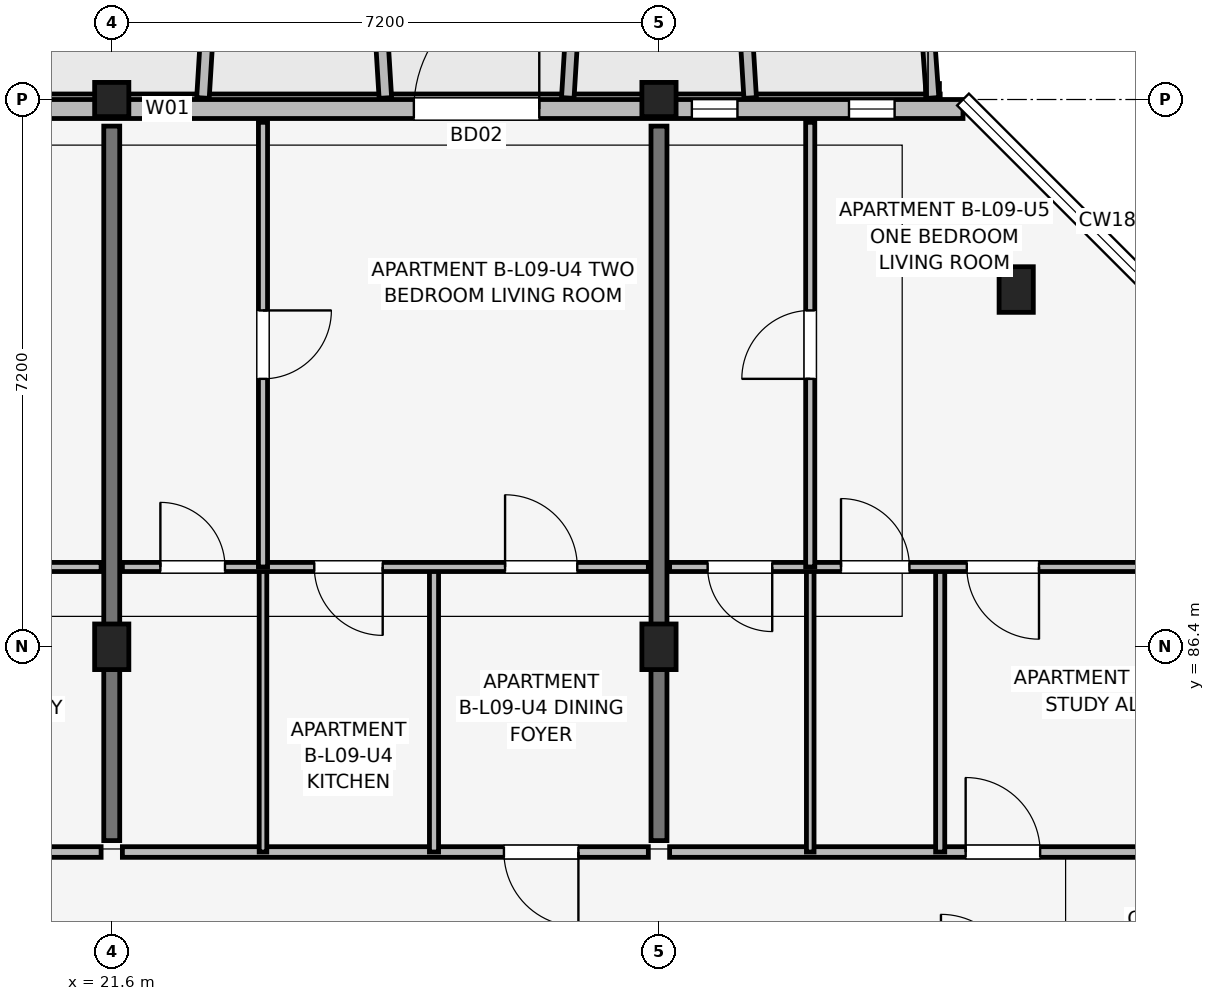
"""IFC4 building model, lengths in metres.
Left out: names, types, materials, properties, quantities, classifications, styles, units other than length and angle.
Written with IfcOpenShell. Run it as: python <this file> out.ifc"""

import sys

from ifc_helpers import new_model, si_unit, direction, frame, frame_2d, origin, origin_2d, place, context, subcontext, project, spatial, rectangle, extrude, element, fill, save


model = new_model("IFC4")
c1 = context("Model", 3, precision=1e-05, world=origin(), true_north=direction((0.0, 1.0)))
c2 = subcontext(c1, "Body", "Model", "MODEL_VIEW")
j1 = project(units=[si_unit("LENGTHUNIT", "METRE"), si_unit("PLANEANGLEUNIT", "RADIAN")], contexts=[c1])
p1 = place(None, origin())
s1 = spatial("IfcSite", under=j1, at=p1, CompositionType="ELEMENT")
p2 = place(p1, origin())
s2 = spatial("IfcBuilding", under=s1, at=p2, CompositionType="ELEMENT")
p3 = place(p2, frame((0.0, 0.0, 30.75)))
s3 = spatial("IfcBuildingStorey", under=s2, at=p3, CompositionType="ELEMENT", Elevation=30.75)
p4 = place(p3, frame((21.6, 86.4, 0.0), z_axis=(0.0, 0.0, 1.0), x_axis=(1.0, 0.0, 0.0)))
e1 = element("IfcColumn", 1, at=p4, inside=s3, PredefinedType="COLUMN", context=c2, shape_type="SweptSolid", body=[
    extrude(rectangle(XDim=0.45, YDim=0.6, at=origin_2d()), origin(), (0.0, 0.0, 1.0), 3.15),
])
p5 = place(p3, frame((21.6, 93.6, 0.0), z_axis=(0.0, 0.0, 1.0), x_axis=(1.0, 0.0, 0.0)))
e2 = element("IfcColumn", 2, at=p5, inside=s3, PredefinedType="COLUMN", context=c2, shape_type="SweptSolid", body=[
    extrude(rectangle(XDim=0.45, YDim=0.45, at=origin_2d()), origin(), (0.0, 0.0, 1.0), 3.15),
])
p6 = place(p3, frame((28.8, 86.4, 0.0), z_axis=(0.0, 0.0, 1.0), x_axis=(1.0, 0.0, 0.0)))
e3 = element("IfcColumn", 3, at=p6, inside=s3, PredefinedType="COLUMN", context=c2, shape_type="SweptSolid", body=[
    extrude(rectangle(XDim=0.45, YDim=0.6, at=origin_2d()), origin(), (0.0, 0.0, 1.0), 3.15),
])
p7 = place(p3, frame((28.8, 93.6, 0.0), z_axis=(0.0, 0.0, 1.0), x_axis=(1.0, 0.0, 0.0)))
e4 = element("IfcColumn", 4, at=p7, inside=s3, PredefinedType="COLUMN", context=c2, shape_type="SweptSolid", body=[
    extrude(rectangle(XDim=0.45, YDim=0.45, at=origin_2d()), origin(), (0.0, 0.0, 1.0), 3.15),
])
p8 = place(p3, frame((33.5, 91.1, 0.0), z_axis=(0.0, 0.0, 1.0), x_axis=(1.0, 0.0, 0.0)))
e5 = element("IfcColumn", 5, at=p8, inside=s3, PredefinedType="COLUMN", context=c2, shape_type="SweptSolid", body=[
    extrude(rectangle(XDim=0.45, YDim=0.6, at=origin_2d()), origin(), (0.0, 0.0, 1.0), 3.15),
])
for number, where, z_axis, x_axis in (
    (6, (21.6, 83.85, 0.0), (0.0, 0.0, 1.0), (0.0, 1.0, 0.0)),
    (7, (28.8, 83.85, 0.0), (0.0, 0.0, 1.0), (0.0, 1.0, 0.0)),
):
    element("IfcWall", number, at=place(p3, frame(where, z_axis=z_axis, x_axis=x_axis)), inside=s3, PredefinedType="SHEAR", context=c2, shape_type="SweptSolid", body=[
        extrude(rectangle(XDim=9.4, YDim=0.21, at=frame_2d((4.7, 0.0))), origin(), (0.0, 0.0, 1.0), 3.15),
    ])
p9 = place(p3, frame((32.8, 93.475, 0.0), z_axis=(0.0, 0.0, 1.0), x_axis=(-1.0, 0.0, 0.0)))
e8 = element("IfcWall", 8, at=p9, inside=s3, PredefinedType="SOLIDWALL", context=c2, shape_type="SweptSolid", body=[
    extrude(rectangle(XDim=29.6, YDim=0.25, at=frame_2d((14.8, 0.0))), origin(), (0.0, 0.0, 1.0), 2.45),
])
p10 = place(p9, frame((21.7, 0.0, 0.0), z_axis=(0.0, 0.0, 1.0), x_axis=(-1.0, 0.0, 0.0)))
e9 = element("IfcOpeningElement", 9, at=p10, cuts=e8, PredefinedType="OPENING", context=c2, shape_type="SweptSolid", body=[
    extrude(rectangle(XDim=1.8, YDim=2.15, at=frame_2d((0.9, 1.075))), frame((0.0, 0.135, 0.0), z_axis=(0.0, -1.0, 0.0), x_axis=(1.0, 0.0, 0.0)), (0.0, 0.0, 1.0), 0.27),
])
p11 = place(p9, frame((7.225, 0.0, 0.0), z_axis=(0.0, 0.0, 1.0), x_axis=(-1.0, 0.0, 0.0)))
e10 = element("IfcOpeningElement", 10, at=p11, cuts=e8, PredefinedType="OPENING", context=c2, shape_type="SweptSolid", body=[
    extrude(rectangle(XDim=1.65, YDim=2.15, at=frame_2d((0.825, 1.075))), frame((0.0, 0.135, 0.0), z_axis=(0.0, -1.0, 0.0), x_axis=(1.0, 0.0, 0.0)), (0.0, 0.0, 1.0), 0.27),
])
p12 = place(p9, frame((27.365, 0.0, 0.75)))
e11 = element("IfcOpeningElement", 11, at=p12, cuts=e8, PredefinedType="OPENING", context=c2, shape_type="SweptSolid", body=[
    extrude(rectangle(XDim=1.1, YDim=1.5, at=frame_2d((0.55, 0.75))), frame((0.0, 0.135, 0.0), z_axis=(0.0, -1.0, 0.0), x_axis=(1.0, 0.0, 0.0)), (0.0, 0.0, 1.0), 0.27),
])
p13 = place(p9, frame((14.925, 0.0, 0.69)))
e12 = element("IfcOpeningElement", 12, at=p13, cuts=e8, PredefinedType="OPENING", context=c2, shape_type="SweptSolid", body=[
    extrude(rectangle(XDim=2.15, YDim=1.65, at=frame_2d((1.075, 0.825))), frame((0.0, 0.135, 0.0), z_axis=(0.0, -1.0, 0.0), x_axis=(1.0, 0.0, 0.0)), (0.0, 0.0, 1.0), 0.27),
])
p14 = place(p9, frame((10.167, 0.0, 0.75)))
e13 = element("IfcOpeningElement", 13, at=p14, cuts=e8, PredefinedType="OPENING", context=c2, shape_type="SweptSolid", body=[
    extrude(rectangle(XDim=0.6, YDim=1.25, at=frame_2d((0.3, 0.625))), frame((0.0, 0.135, 0.0), z_axis=(0.0, -1.0, 0.0), x_axis=(1.0, 0.0, 0.0)), (0.0, 0.0, 1.0), 0.27),
])
p15 = place(p9, frame((2.968, 0.0, 0.75)))
e14 = element("IfcOpeningElement", 14, at=p15, cuts=e8, PredefinedType="OPENING", context=c2, shape_type="SweptSolid", body=[
    extrude(rectangle(XDim=0.6, YDim=1.25, at=frame_2d((0.3, 0.625))), frame((0.0, 0.135, 0.0), z_axis=(0.0, -1.0, 0.0), x_axis=(1.0, 0.0, 0.0)), (0.0, 0.0, 1.0), 0.27),
])
p16 = place(p9, frame((0.9, 0.0, 0.75)))
e15 = element("IfcOpeningElement", 15, at=p16, cuts=e8, PredefinedType="OPENING", context=c2, shape_type="SweptSolid", body=[
    extrude(rectangle(XDim=0.6, YDim=1.25, at=frame_2d((0.3, 0.625))), frame((0.0, 0.135, 0.0), z_axis=(0.0, -1.0, 0.0), x_axis=(1.0, 0.0, 0.0)), (0.0, 0.0, 1.0), 0.27),
])
for number, where, z_axis, x_axis in (
    (16, (22.8, 93.62, 0.0), (0.0, 0.0, 1.0), (0.061, 0.998, 0.0)),
    (17, (25.2, 93.62, 0.0), (0.0, 0.0, 1.0), (-0.061, 0.998, 0.0)),
    (18, (27.6, 93.62, 0.0), (0.0, 0.0, 1.0), (0.061, 0.998, 0.0)),
):
    element("IfcWall", number, at=place(p3, frame(where, z_axis=z_axis, x_axis=x_axis)), inside=s3, PredefinedType="ELEMENTEDWALL", context=c2, shape_type="SweptSolid", body=[
        extrude(rectangle(XDim=1.964, YDim=0.165, at=frame_2d((0.982, 0.0))), origin(), (0.0, 0.0, 1.0), 2.53),
    ])
p17 = place(p3, frame((30.0, 93.62, 0.0), z_axis=(0.0, 0.0, 1.0), x_axis=(-0.061170732449, 0.998127317276, 0.0)))
e19 = element("IfcWall", 19, at=p17, inside=s3, PredefinedType="ELEMENTEDWALL", context=c2, shape_type="SweptSolid", body=[
    extrude(rectangle(XDim=1.964, YDim=0.165, at=frame_2d((0.982, 0.0))), origin(), (0.0, 0.0, 1.0), 2.8),
])
p18 = place(p3, frame((32.4, 93.62, 0.0), z_axis=(0.0, 0.0, 1.0), x_axis=(-0.071194071069, 0.997462482625, 0.0)))
e20 = element("IfcWall", 20, at=p18, inside=s3, PredefinedType="ELEMENTEDWALL", context=c2, shape_type="SweptSolid", body=[
    extrude(rectangle(XDim=1.965, YDim=0.165, at=frame_2d((0.982, 0.0))), origin(), (0.0, 0.0, 1.0), 2.8),
])
p19 = place(p3, frame((14.54, 83.7, 0.0), z_axis=(0.0, 0.0, 1.0), x_axis=(1.0, 0.0, 0.0)))
e21 = element("IfcWall", 21, at=p19, inside=s3, PredefinedType="PARTITIONING", context=c2, shape_type="SweptSolid", body=[
    extrude(rectangle(XDim=6.92, YDim=0.14, at=frame_2d((3.46, 0.0))), origin(), (0.0, 0.0, 1.0), 2.38),
])
p20 = place(p19, frame((5.85, 0.0, 0.0), z_axis=(0.0, 0.0, 1.0), x_axis=(-1.0, 0.0, 0.0)))
e22 = element("IfcOpeningElement", 22, at=p20, cuts=e21, PredefinedType="OPENING", context=c2, shape_type="SweptSolid", body=[
    extrude(rectangle(XDim=0.98, YDim=2.1, at=frame_2d((0.49, 1.05))), frame((0.0, 0.08, 0.0), z_axis=(0.0, -1.0, 0.0), x_axis=(1.0, 0.0, 0.0)), (0.0, 0.0, 1.0), 0.16),
])
p21 = place(p3, frame((14.54, 87.45, 0.0), z_axis=(0.0, 0.0, 1.0), x_axis=(1.0, 0.0, 0.0)))
e23 = element("IfcWall", 23, at=p21, inside=s3, PredefinedType="PARTITIONING", context=c2, shape_type="SweptSolid", body=[
    extrude(rectangle(XDim=6.92, YDim=0.12, at=frame_2d((3.46, 0.0))), origin(), (0.0, 0.0, 1.0), 2.38),
])
p22 = place(p21, frame((0.5, 0.0, 0.0)))
e24 = element("IfcOpeningElement", 24, at=p22, cuts=e23, PredefinedType="OPENING", context=c2, shape_type="SweptSolid", body=[
    extrude(rectangle(XDim=0.85, YDim=2.08, at=frame_2d((0.425, 1.04))), frame((0.0, 0.07, 0.0), z_axis=(0.0, -1.0, 0.0), x_axis=(1.0, 0.0, 0.0)), (0.0, 0.0, 1.0), 0.14),
])
p23 = place(p21, frame((3.275, 0.0, 0.0), z_axis=(0.0, 0.0, 1.0), x_axis=(-1.0, 0.0, 0.0)))
e25 = element("IfcOpeningElement", 25, at=p23, cuts=e23, PredefinedType="OPENING", context=c2, shape_type="SweptSolid", body=[
    extrude(rectangle(XDim=0.9, YDim=2.08, at=frame_2d((0.45, 1.04))), frame((0.0, 0.07, 0.0), z_axis=(0.0, -1.0, 0.0), x_axis=(1.0, 0.0, 0.0)), (0.0, 0.0, 1.0), 0.14),
])
p24 = place(p21, frame((4.885, 0.0, 0.0)))
e26 = element("IfcOpeningElement", 26, at=p24, cuts=e23, PredefinedType="OPENING", context=c2, shape_type="SweptSolid", body=[
    extrude(rectangle(XDim=0.95, YDim=2.08, at=frame_2d((0.475, 1.04))), frame((0.0, 0.07, 0.0), z_axis=(0.0, -1.0, 0.0), x_axis=(1.0, 0.0, 0.0)), (0.0, 0.0, 1.0), 0.14),
])
p25 = place(p3, frame((21.74, 83.7, 0.0), z_axis=(0.0, 0.0, 1.0), x_axis=(1.0, 0.0, 0.0)))
e27 = element("IfcWall", 27, at=p25, inside=s3, PredefinedType="PARTITIONING", context=c2, shape_type="SweptSolid", body=[
    extrude(rectangle(XDim=6.92, YDim=0.14, at=frame_2d((3.46, 0.0))), origin(), (0.0, 0.0, 1.0), 2.38),
])
p26 = place(p25, frame((6.0, 0.0, 0.0), z_axis=(0.0, 0.0, 1.0), x_axis=(-1.0, 0.0, 0.0)))
e28 = element("IfcOpeningElement", 28, at=p26, cuts=e27, PredefinedType="OPENING", context=c2, shape_type="SweptSolid", body=[
    extrude(rectangle(XDim=0.98, YDim=2.1, at=frame_2d((0.49, 1.05))), frame((0.0, 0.08, 0.0), z_axis=(0.0, -1.0, 0.0), x_axis=(1.0, 0.0, 0.0)), (0.0, 0.0, 1.0), 0.16),
])
p27 = place(p3, frame((23.59, 83.7, 0.0), z_axis=(0.0, 0.0, 1.0), x_axis=(0.0, 1.0, 0.0)))
e29 = element("IfcWall", 29, at=p27, inside=s3, PredefinedType="PARTITIONING", context=c2, shape_type="SweptSolid", body=[
    extrude(rectangle(XDim=3.75, YDim=0.1, at=frame_2d((1.875, 0.0))), origin(), (0.0, 0.0, 1.0), 2.38),
])
p28 = place(p3, frame((25.84, 83.7, 0.0), z_axis=(0.0, 0.0, 1.0), x_axis=(0.0, 1.0, 0.0)))
e30 = element("IfcWall", 30, at=p28, inside=s3, PredefinedType="PARTITIONING", context=c2, shape_type="SweptSolid", body=[
    extrude(rectangle(XDim=3.75, YDim=0.12, at=frame_2d((1.875, 0.0))), origin(), (0.0, 0.0, 1.0), 2.38),
])
p29 = place(p3, frame((21.74, 87.45, 0.0), z_axis=(0.0, 0.0, 1.0), x_axis=(1.0, 0.0, 0.0)))
e31 = element("IfcWall", 31, at=p29, inside=s3, PredefinedType="PARTITIONING", context=c2, shape_type="SweptSolid", body=[
    extrude(rectangle(XDim=6.92, YDim=0.12, at=frame_2d((3.46, 0.0))), origin(), (0.0, 0.0, 1.0), 2.38),
])
p30 = place(p29, frame((0.5, 0.0, 0.0)))
e32 = element("IfcOpeningElement", 32, at=p30, cuts=e31, PredefinedType="OPENING", context=c2, shape_type="SweptSolid", body=[
    extrude(rectangle(XDim=0.85, YDim=2.08, at=frame_2d((0.425, 1.04))), frame((0.0, 0.07, 0.0), z_axis=(0.0, -1.0, 0.0), x_axis=(1.0, 0.0, 0.0)), (0.0, 0.0, 1.0), 0.14),
])
p31 = place(p29, frame((3.425, 0.0, 0.0), z_axis=(0.0, 0.0, 1.0), x_axis=(-1.0, 0.0, 0.0)))
e33 = element("IfcOpeningElement", 33, at=p31, cuts=e31, PredefinedType="OPENING", context=c2, shape_type="SweptSolid", body=[
    extrude(rectangle(XDim=0.9, YDim=2.08, at=frame_2d((0.45, 1.04))), frame((0.0, 0.07, 0.0), z_axis=(0.0, -1.0, 0.0), x_axis=(1.0, 0.0, 0.0)), (0.0, 0.0, 1.0), 0.14),
])
p32 = place(p29, frame((5.035, 0.0, 0.0)))
e34 = element("IfcOpeningElement", 34, at=p32, cuts=e31, PredefinedType="OPENING", context=c2, shape_type="SweptSolid", body=[
    extrude(rectangle(XDim=0.95, YDim=2.08, at=frame_2d((0.475, 1.04))), frame((0.0, 0.07, 0.0), z_axis=(0.0, -1.0, 0.0), x_axis=(1.0, 0.0, 0.0)), (0.0, 0.0, 1.0), 0.14),
])
p33 = place(p3, frame((23.59, 87.45, 0.0), z_axis=(0.0, 0.0, 1.0), x_axis=(0.0, 1.0, 0.0)))
e35 = element("IfcWall", 35, at=p33, inside=s3, PredefinedType="PARTITIONING", context=c2, shape_type="SweptSolid", body=[
    extrude(rectangle(XDim=5.85, YDim=0.12, at=frame_2d((2.925, 0.0))), origin(), (0.0, 0.0, 1.0), 2.38),
])
p34 = place(p33, frame((3.375, 0.0, 0.0), z_axis=(0.0, 0.0, 1.0), x_axis=(-1.0, 0.0, 0.0)))
e36 = element("IfcOpeningElement", 36, at=p34, cuts=e35, PredefinedType="OPENING", context=c2, shape_type="SweptSolid", body=[
    extrude(rectangle(XDim=0.9, YDim=2.08, at=frame_2d((0.45, 1.04))), frame((0.0, 0.07, 0.0), z_axis=(0.0, -1.0, 0.0), x_axis=(1.0, 0.0, 0.0)), (0.0, 0.0, 1.0), 0.14),
])
p35 = place(p3, frame((28.94, 83.7, 0.0), z_axis=(0.0, 0.0, 1.0), x_axis=(1.0, 0.0, 0.0)))
e37 = element("IfcWall", 37, at=p35, inside=s3, PredefinedType="PARTITIONING", context=c2, shape_type="SweptSolid", body=[
    extrude(rectangle(XDim=6.92, YDim=0.14, at=frame_2d((3.46, 0.0))), origin(), (0.0, 0.0, 1.0), 2.38),
])
p36 = place(p35, frame((3.895, 0.0, 0.0)))
e38 = element("IfcOpeningElement", 38, at=p36, cuts=e37, PredefinedType="OPENING", context=c2, shape_type="SweptSolid", body=[
    extrude(rectangle(XDim=0.98, YDim=2.1, at=frame_2d((0.49, 1.05))), frame((0.0, 0.08, 0.0), z_axis=(0.0, -1.0, 0.0), x_axis=(1.0, 0.0, 0.0)), (0.0, 0.0, 1.0), 0.16),
])
p37 = place(p3, frame((30.79, 83.7, 0.0), z_axis=(0.0, 0.0, 1.0), x_axis=(0.0, 1.0, 0.0)))
e39 = element("IfcWall", 39, at=p37, inside=s3, PredefinedType="PARTITIONING", context=c2, shape_type="SweptSolid", body=[
    extrude(rectangle(XDim=3.75, YDim=0.1, at=frame_2d((1.875, 0.0))), origin(), (0.0, 0.0, 1.0), 2.38),
])
p38 = place(p3, frame((32.5, 83.7, 0.0), z_axis=(0.0, 0.0, 1.0), x_axis=(0.0, 1.0, 0.0)))
e40 = element("IfcWall", 40, at=p38, inside=s3, PredefinedType="PARTITIONING", context=c2, shape_type="SweptSolid", body=[
    extrude(rectangle(XDim=3.75, YDim=0.12, at=frame_2d((1.875, 0.0))), origin(), (0.0, 0.0, 1.0), 2.38),
])
p39 = place(p3, frame((28.94, 87.45, 0.0), z_axis=(0.0, 0.0, 1.0), x_axis=(1.0, 0.0, 0.0)))
e41 = element("IfcWall", 41, at=p39, inside=s3, PredefinedType="PARTITIONING", context=c2, shape_type="SweptSolid", body=[
    extrude(rectangle(XDim=6.92, YDim=0.12, at=frame_2d((3.46, 0.0))), origin(), (0.0, 0.0, 1.0), 2.38),
])
p40 = place(p39, frame((1.35, 0.0, 0.0), z_axis=(0.0, 0.0, 1.0), x_axis=(-1.0, 0.0, 0.0)))
e42 = element("IfcOpeningElement", 42, at=p40, cuts=e41, PredefinedType="OPENING", context=c2, shape_type="SweptSolid", body=[
    extrude(rectangle(XDim=0.85, YDim=2.08, at=frame_2d((0.425, 1.04))), frame((0.0, 0.07, 0.0), z_axis=(0.0, -1.0, 0.0), x_axis=(1.0, 0.0, 0.0)), (0.0, 0.0, 1.0), 0.14),
])
p41 = place(p39, frame((2.255, 0.0, 0.0)))
e43 = element("IfcOpeningElement", 43, at=p41, cuts=e41, PredefinedType="OPENING", context=c2, shape_type="SweptSolid", body=[
    extrude(rectangle(XDim=0.9, YDim=2.08, at=frame_2d((0.45, 1.04))), frame((0.0, 0.07, 0.0), z_axis=(0.0, -1.0, 0.0), x_axis=(1.0, 0.0, 0.0)), (0.0, 0.0, 1.0), 0.14),
])
p42 = place(p39, frame((4.86, 0.0, 0.0), z_axis=(0.0, 0.0, 1.0), x_axis=(-1.0, 0.0, 0.0)))
e44 = element("IfcOpeningElement", 44, at=p42, cuts=e41, PredefinedType="OPENING", context=c2, shape_type="SweptSolid", body=[
    extrude(rectangle(XDim=0.95, YDim=2.08, at=frame_2d((0.475, 1.04))), frame((0.0, 0.07, 0.0), z_axis=(0.0, -1.0, 0.0), x_axis=(1.0, 0.0, 0.0)), (0.0, 0.0, 1.0), 0.14),
])
p43 = place(p3, frame((30.79, 87.45, 0.0), z_axis=(0.0, 0.0, 1.0), x_axis=(0.0, 1.0, 0.0)))
e45 = element("IfcWall", 45, at=p43, inside=s3, PredefinedType="PARTITIONING", context=c2, shape_type="SweptSolid", body=[
    extrude(rectangle(XDim=5.85, YDim=0.12, at=frame_2d((2.925, 0.0))), origin(), (0.0, 0.0, 1.0), 2.38),
])
p44 = place(p43, frame((2.475, 0.0, 0.0)))
e46 = element("IfcOpeningElement", 46, at=p44, cuts=e45, PredefinedType="OPENING", context=c2, shape_type="SweptSolid", body=[
    extrude(rectangle(XDim=0.9, YDim=2.08, at=frame_2d((0.45, 1.04))), frame((0.0, 0.07, 0.0), z_axis=(0.0, -1.0, 0.0), x_axis=(1.0, 0.0, 0.0)), (0.0, 0.0, 1.0), 0.14),
])
p45 = place(p11, origin())
e47 = element("IfcDoor", 47, at=p45, inside=s3, OperationType="SINGLE_SWING_LEFT", PredefinedType="DOOR", context=c2, shape_type="SweptSolid", body=[
    extrude(rectangle(XDim=1.65, YDim=2.15, at=frame_2d((0.825, 1.075))), frame((0.0, 0.025, 0.0), z_axis=(0.0, -1.0, 0.0), x_axis=(1.0, 0.0, 0.0)), (0.0, 0.0, 1.0), 0.05),
])
fill(e10, e47)
p46 = place(p14, origin())
e48 = element("IfcWindow", 48, at=p46, inside=s3, PartitioningType="SINGLE_PANEL", PredefinedType="WINDOW", context=c2, shape_type="SweptSolid", body=[
    extrude(rectangle(XDim=0.6, YDim=1.25, at=frame_2d((0.3, 0.625))), frame((0.0, 0.03, 0.0), z_axis=(0.0, -1.0, 0.0), x_axis=(1.0, 0.0, 0.0)), (0.0, 0.0, 1.0), 0.06),
])
fill(e13, e48)
p47 = place(p15, origin())
e49 = element("IfcWindow", 49, at=p47, inside=s3, PartitioningType="SINGLE_PANEL", PredefinedType="WINDOW", context=c2, shape_type="SweptSolid", body=[
    extrude(rectangle(XDim=0.6, YDim=1.25, at=frame_2d((0.3, 0.625))), frame((0.0, 0.03, 0.0), z_axis=(0.0, -1.0, 0.0), x_axis=(1.0, 0.0, 0.0)), (0.0, 0.0, 1.0), 0.06),
])
fill(e14, e49)
p48 = place(p16, origin())
e50 = element("IfcWindow", 50, at=p48, inside=s3, PartitioningType="SINGLE_PANEL", PredefinedType="WINDOW", context=c2, shape_type="SweptSolid", body=[
    extrude(rectangle(XDim=0.6, YDim=1.25, at=frame_2d((0.3, 0.625))), frame((0.0, 0.03, 0.0), z_axis=(0.0, -1.0, 0.0), x_axis=(1.0, 0.0, 0.0)), (0.0, 0.0, 1.0), 0.06),
])
fill(e15, e50)
p49 = place(p26, origin())
e51 = element("IfcDoor", 51, at=p49, inside=s3, OperationType="SINGLE_SWING_RIGHT", PredefinedType="DOOR", context=c2, shape_type="SweptSolid", body=[
    extrude(rectangle(XDim=0.98, YDim=2.1, at=frame_2d((0.49, 1.05))), frame((0.0, 0.025, 0.0), z_axis=(0.0, -1.0, 0.0), x_axis=(1.0, 0.0, 0.0)), (0.0, 0.0, 1.0), 0.05),
])
fill(e28, e51)
p50 = place(p30, origin())
e52 = element("IfcDoor", 52, at=p50, inside=s3, OperationType="SINGLE_SWING_LEFT", PredefinedType="DOOR", context=c2, shape_type="SweptSolid", body=[
    extrude(rectangle(XDim=0.85, YDim=2.08, at=frame_2d((0.425, 1.04))), frame((0.0, 0.025, 0.0), z_axis=(0.0, -1.0, 0.0), x_axis=(1.0, 0.0, 0.0)), (0.0, 0.0, 1.0), 0.05),
])
fill(e32, e52)
p51 = place(p31, origin())
e53 = element("IfcDoor", 53, at=p51, inside=s3, OperationType="SINGLE_SWING_RIGHT", PredefinedType="DOOR", context=c2, shape_type="SweptSolid", body=[
    extrude(rectangle(XDim=0.9, YDim=2.08, at=frame_2d((0.45, 1.04))), frame((0.0, 0.025, 0.0), z_axis=(0.0, -1.0, 0.0), x_axis=(1.0, 0.0, 0.0)), (0.0, 0.0, 1.0), 0.05),
])
fill(e33, e53)
p52 = place(p32, origin())
e54 = element("IfcDoor", 54, at=p52, inside=s3, OperationType="SINGLE_SWING_LEFT", PredefinedType="DOOR", context=c2, shape_type="SweptSolid", body=[
    extrude(rectangle(XDim=0.95, YDim=2.08, at=frame_2d((0.475, 1.04))), frame((0.0, 0.025, 0.0), z_axis=(0.0, -1.0, 0.0), x_axis=(1.0, 0.0, 0.0)), (0.0, 0.0, 1.0), 0.05),
])
fill(e34, e54)
p53 = place(p34, origin())
e55 = element("IfcDoor", 55, at=p53, inside=s3, OperationType="SINGLE_SWING_RIGHT", PredefinedType="DOOR", context=c2, shape_type="SweptSolid", body=[
    extrude(rectangle(XDim=0.9, YDim=2.08, at=frame_2d((0.45, 1.04))), frame((0.0, 0.025, 0.0), z_axis=(0.0, -1.0, 0.0), x_axis=(1.0, 0.0, 0.0)), (0.0, 0.0, 1.0), 0.05),
])
fill(e36, e55)
p54 = place(p36, origin())
e56 = element("IfcDoor", 56, at=p54, inside=s3, OperationType="SINGLE_SWING_LEFT", PredefinedType="DOOR", context=c2, shape_type="SweptSolid", body=[
    extrude(rectangle(XDim=0.98, YDim=2.1, at=frame_2d((0.49, 1.05))), frame((0.0, 0.025, 0.0), z_axis=(0.0, -1.0, 0.0), x_axis=(1.0, 0.0, 0.0)), (0.0, 0.0, 1.0), 0.05),
])
fill(e38, e56)
p55 = place(p40, origin())
e57 = element("IfcDoor", 57, at=p55, inside=s3, OperationType="SINGLE_SWING_RIGHT", PredefinedType="DOOR", context=c2, shape_type="SweptSolid", body=[
    extrude(rectangle(XDim=0.85, YDim=2.08, at=frame_2d((0.425, 1.04))), frame((0.0, 0.025, 0.0), z_axis=(0.0, -1.0, 0.0), x_axis=(1.0, 0.0, 0.0)), (0.0, 0.0, 1.0), 0.05),
])
fill(e42, e57)
p56 = place(p41, origin())
e58 = element("IfcDoor", 58, at=p56, inside=s3, OperationType="SINGLE_SWING_LEFT", PredefinedType="DOOR", context=c2, shape_type="SweptSolid", body=[
    extrude(rectangle(XDim=0.9, YDim=2.08, at=frame_2d((0.45, 1.04))), frame((0.0, 0.025, 0.0), z_axis=(0.0, -1.0, 0.0), x_axis=(1.0, 0.0, 0.0)), (0.0, 0.0, 1.0), 0.05),
])
fill(e43, e58)
p57 = place(p42, origin())
e59 = element("IfcDoor", 59, at=p57, inside=s3, OperationType="SINGLE_SWING_RIGHT", PredefinedType="DOOR", context=c2, shape_type="SweptSolid", body=[
    extrude(rectangle(XDim=0.95, YDim=2.08, at=frame_2d((0.475, 1.04))), frame((0.0, 0.025, 0.0), z_axis=(0.0, -1.0, 0.0), x_axis=(1.0, 0.0, 0.0)), (0.0, 0.0, 1.0), 0.05),
])
fill(e44, e59)
p58 = place(p44, origin())
e60 = element("IfcDoor", 60, at=p58, inside=s3, OperationType="SINGLE_SWING_LEFT", PredefinedType="DOOR", context=c2, shape_type="SweptSolid", body=[
    extrude(rectangle(XDim=0.9, YDim=2.08, at=frame_2d((0.45, 1.04))), frame((0.0, 0.025, 0.0), z_axis=(0.0, -1.0, 0.0), x_axis=(1.0, 0.0, 0.0)), (0.0, 0.0, 1.0), 0.05),
])
fill(e46, e60)
save(model, sys.argv[1])
